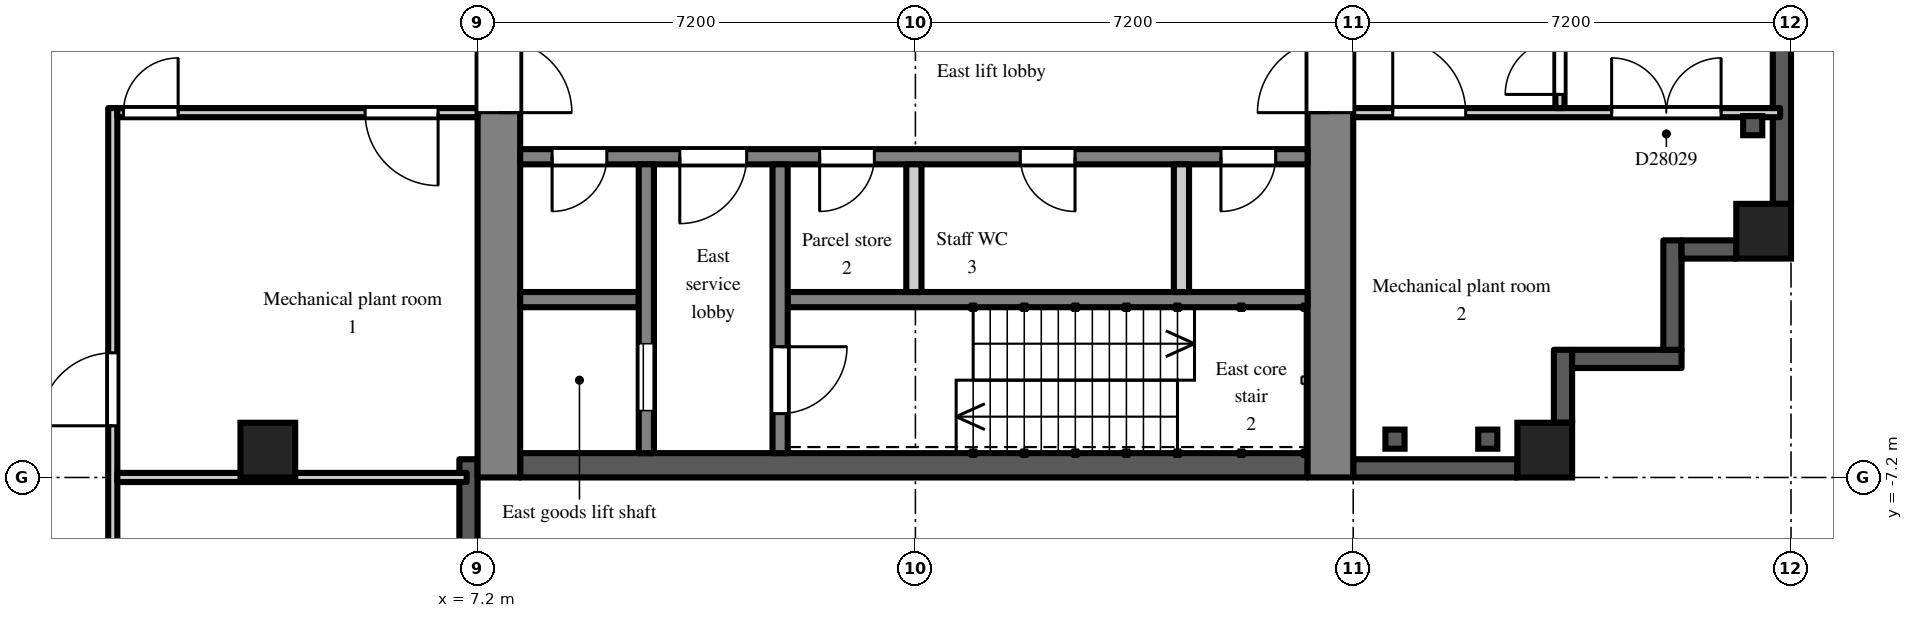
"""IFC4 building model, lengths in metres.
Left out: names, types, materials, properties, quantities, classifications, styles, units other than length and angle.
Written with IfcOpenShell. Run it as: python <this file> out.ifc"""

import sys

from ifc_helpers import new_model, si_unit, direction, frame, frame_2d, origin, origin_2d, place, context, subcontext, project, spatial, rectangle, extrude, element, fill, save


model = new_model("IFC4")
c1 = context("Model", 3, precision=1e-05, world=origin(), true_north=direction((0.0, 1.0)))
c2 = subcontext(c1, "Body", "Model", "MODEL_VIEW")
j1 = project(units=[si_unit("LENGTHUNIT", "METRE"), si_unit("PLANEANGLEUNIT", "RADIAN")], contexts=[c1])
p1 = place(None, origin())
s1 = spatial("IfcSite", under=j1, at=p1, CompositionType="ELEMENT")
p2 = place(p1, origin())
s2 = spatial("IfcBuilding", under=s1, at=p2, CompositionType="ELEMENT")
p3 = place(p2, frame((0.0, 0.0, 194.7)))
s3 = spatial("IfcBuildingStorey", under=s2, at=p3, CompositionType="ELEMENT", Elevation=194.7)
for number, where, z_axis, x_axis in (
    (1, (3.75, -6.75, 0.0), (0.0, 0.0, 1.0), (1.0, 0.0, 0.0)),
    (2, (24.75, -6.75, 0.0), (0.0, 0.0, 1.0), (1.0, 0.0, 0.0)),
    (3, (28.35, -3.15, 0.0), (0.0, 0.0, 1.0), (1.0, 0.0, 0.0)),
):
    element("IfcColumn", number, at=place(p3, frame(where, z_axis=z_axis, x_axis=x_axis)), inside=s3, PredefinedType="COLUMN", context=c2, shape_type="SweptSolid", body=[
        extrude(rectangle(XDim=0.9, YDim=0.9, at=origin_2d()), origin(), (0.0, 0.0, 1.0), 4.2),
    ])
p4 = place(p3, frame((21.6, -7.05, 0.0), z_axis=(0.0, 0.0, 1.0), x_axis=(1.0, 0.0, 0.0)))
e4 = element("IfcWall", 4, at=p4, inside=s3, PredefinedType="SOLIDWALL", context=c2, shape_type="SweptSolid", body=[
    extrude(rectangle(XDim=2.7, YDim=0.3, at=frame_2d((1.35, 0.0))), origin(), (0.0, 0.0, 1.0), 3.5),
])
p5 = place(p3, frame((25.05, -6.3, 0.0), z_axis=(0.0, 0.0, 1.0), x_axis=(0.0, 1.0, 0.0)))
e5 = element("IfcWall", 5, at=p5, inside=s3, PredefinedType="SOLIDWALL", context=c2, shape_type="SweptSolid", body=[
    extrude(rectangle(XDim=1.2, YDim=0.3, at=frame_2d((0.6, 0.0))), origin(), (0.0, 0.0, 1.0), 3.8),
])
for number, where, z_axis, x_axis in (
    (6, (25.2, -5.25, 0.0), (0.0, 0.0, 1.0), (1.0, 0.0, 0.0)),
    (7, (26.85, -5.1, 0.0), (0.0, 0.0, 1.0), (0.0, 1.0, 0.0)),
):
    element("IfcWall", number, at=place(p3, frame(where, z_axis=z_axis, x_axis=x_axis)), inside=s3, PredefinedType="SOLIDWALL", context=c2, shape_type="SweptSolid", body=[
        extrude(rectangle(XDim=1.8, YDim=0.3, at=frame_2d((0.9, 0.0))), origin(), (0.0, 0.0, 1.0), 3.8),
    ])
p6 = place(p3, frame((27.0, -3.45, 0.0), z_axis=(0.0, 0.0, 1.0), x_axis=(1.0, 0.0, 0.0)))
e8 = element("IfcWall", 8, at=p6, inside=s3, PredefinedType="SOLIDWALL", context=c2, shape_type="SweptSolid", body=[
    extrude(rectangle(XDim=0.9, YDim=0.3, at=frame_2d((0.45, 0.0))), origin(), (0.0, 0.0, 1.0), 3.8),
])
p7 = place(p3, frame((28.65, -2.7, 0.0), z_axis=(0.0, 0.0, 1.0), x_axis=(0.0, 1.0, 0.0)))
e9 = element("IfcWall", 9, at=p7, inside=s3, PredefinedType="SOLIDWALL", context=c2, shape_type="SweptSolid", body=[
    extrude(rectangle(XDim=5.4, YDim=0.3, at=frame_2d((2.7, 0.0))), origin(), (0.0, 0.0, 1.0), 3.5),
])
p8 = place(p3, frame((7.05, -14.4, 0.0), z_axis=(0.0, 0.0, 1.0), x_axis=(0.0, 1.0, 0.0)))
e10 = element("IfcWall", 10, at=p8, inside=s3, PredefinedType="SOLIDWALL", context=c2, shape_type="SweptSolid", body=[
    extrude(rectangle(XDim=7.5, YDim=0.3, at=frame_2d((3.75, 0.0))), origin(), (0.0, 0.0, 1.0), 3.8),
])
p9 = place(p3, frame((7.55, -7.2, 0.0), z_axis=(0.0, 0.0, 1.0), x_axis=(0.0, 1.0, 0.0)))
e11 = element("IfcWall", 11, at=p9, inside=s3, PredefinedType="SHEAR", context=c2, shape_type="SweptSolid", body=[
    extrude(rectangle(XDim=14.4, YDim=0.7, at=frame_2d((7.2, 0.0))), origin(), (0.0, 0.0, 1.0), 3.8),
])
p10 = place(p9, frame((6.0, 0.0, 0.0)))
e12 = element("IfcOpeningElement", 12, at=p10, cuts=e11, PredefinedType="OPENING", context=c2, shape_type="SweptSolid", body=[
    extrude(rectangle(XDim=2.4, YDim=2.2, at=frame_2d((1.2, 1.1))), frame((0.0, 0.36, 0.0), z_axis=(0.0, -1.0, 0.0), x_axis=(1.0, 0.0, 0.0)), (0.0, 0.0, 1.0), 0.72),
])
p11 = place(p3, frame((21.225, -7.2, 0.0), z_axis=(0.0, 0.0, 1.0), x_axis=(0.0, 1.0, 0.0)))
e13 = element("IfcWall", 13, at=p11, inside=s3, PredefinedType="SHEAR", context=c2, shape_type="SweptSolid", body=[
    extrude(rectangle(XDim=14.4, YDim=0.75, at=frame_2d((7.2, 0.0))), origin(), (0.0, 0.0, 1.0), 3.8),
])
p12 = place(p11, frame((6.0, 0.0, 0.0)))
e14 = element("IfcOpeningElement", 14, at=p12, cuts=e13, PredefinedType="OPENING", context=c2, shape_type="SweptSolid", body=[
    extrude(rectangle(XDim=2.4, YDim=2.2, at=frame_2d((1.2, 1.1))), frame((0.0, 0.385, 0.0), z_axis=(0.0, -1.0, 0.0), x_axis=(1.0, 0.0, 0.0)), (0.0, 0.0, 1.0), 0.77),
])
p13 = place(p3, frame((7.9, -7.0, 0.0), z_axis=(0.0, 0.0, 1.0), x_axis=(1.0, 0.0, 0.0)))
e15 = element("IfcWall", 15, at=p13, inside=s3, PredefinedType="SHEAR", context=c2, shape_type="SweptSolid", body=[
    extrude(rectangle(XDim=12.95, YDim=0.4, at=frame_2d((6.475, 0.0))), origin(), (0.0, 0.0, 1.0), 3.8),
])
p14 = place(p3, frame((7.9, -1.925, 0.0), z_axis=(0.0, 0.0, 1.0), x_axis=(1.0, 0.0, 0.0)))
e16 = element("IfcWall", 16, at=p14, inside=s3, PredefinedType="SHEAR", context=c2, shape_type="SweptSolid", body=[
    extrude(rectangle(XDim=12.95, YDim=0.25, at=frame_2d((6.475, 0.0))), origin(), (0.0, 0.0, 1.0), 3.8),
])
p15 = place(p14, frame((0.525, 0.0, 0.0)))
e17 = element("IfcOpeningElement", 17, at=p15, cuts=e16, PredefinedType="OPENING", context=c2, shape_type="SweptSolid", body=[
    extrude(rectangle(XDim=0.9, YDim=2.1, at=frame_2d((0.45, 1.05))), frame((0.0, 0.135, 0.0), z_axis=(0.0, -1.0, 0.0), x_axis=(1.0, 0.0, 0.0)), (0.0, 0.0, 1.0), 0.27),
])
p16 = place(p14, frame((2.625, 0.0, 0.0)))
e18 = element("IfcOpeningElement", 18, at=p16, cuts=e16, PredefinedType="OPENING", context=c2, shape_type="SweptSolid", body=[
    extrude(rectangle(XDim=1.1, YDim=2.1, at=frame_2d((0.55, 1.05))), frame((0.0, 0.135, 0.0), z_axis=(0.0, -1.0, 0.0), x_axis=(1.0, 0.0, 0.0)), (0.0, 0.0, 1.0), 0.27),
])
p17 = place(p14, frame((4.925, 0.0, 0.0)))
e19 = element("IfcOpeningElement", 19, at=p17, cuts=e16, PredefinedType="OPENING", context=c2, shape_type="SweptSolid", body=[
    extrude(rectangle(XDim=0.9, YDim=2.1, at=frame_2d((0.45, 1.05))), frame((0.0, 0.135, 0.0), z_axis=(0.0, -1.0, 0.0), x_axis=(1.0, 0.0, 0.0)), (0.0, 0.0, 1.0), 0.27),
])
p18 = place(p14, frame((8.225, 0.0, 0.0)))
e20 = element("IfcOpeningElement", 20, at=p18, cuts=e16, PredefinedType="OPENING", context=c2, shape_type="SweptSolid", body=[
    extrude(rectangle(XDim=0.9, YDim=2.1, at=frame_2d((0.45, 1.05))), frame((0.0, 0.135, 0.0), z_axis=(0.0, -1.0, 0.0), x_axis=(1.0, 0.0, 0.0)), (0.0, 0.0, 1.0), 0.27),
])
p19 = place(p14, frame((11.525, 0.0, 0.0)))
e21 = element("IfcOpeningElement", 21, at=p19, cuts=e16, PredefinedType="OPENING", context=c2, shape_type="SweptSolid", body=[
    extrude(rectangle(XDim=0.9, YDim=2.1, at=frame_2d((0.45, 1.05))), frame((0.0, 0.135, 0.0), z_axis=(0.0, -1.0, 0.0), x_axis=(1.0, 0.0, 0.0)), (0.0, 0.0, 1.0), 0.27),
])
p20 = place(p3, frame((7.9, -4.275, 0.0), z_axis=(0.0, 0.0, 1.0), x_axis=(1.0, 0.0, 0.0)))
e22 = element("IfcWall", 22, at=p20, inside=s3, PredefinedType="SHEAR", context=c2, shape_type="SweptSolid", body=[
    extrude(rectangle(XDim=1.95, YDim=0.25, at=frame_2d((0.975, 0.0))), origin(), (0.0, 0.0, 1.0), 3.8),
])
p21 = place(p3, frame((12.3, -4.275, 0.0), z_axis=(0.0, 0.0, 1.0), x_axis=(1.0, 0.0, 0.0)))
e23 = element("IfcWall", 23, at=p21, inside=s3, PredefinedType="SHEAR", context=c2, shape_type="SweptSolid", body=[
    extrude(rectangle(XDim=8.55, YDim=0.25, at=frame_2d((4.275, 0.0))), origin(), (0.0, 0.0, 1.0), 3.8),
])
p22 = place(p3, frame((9.975, -2.05, 0.0), z_axis=(0.0, 0.0, 1.0), x_axis=(0.0, -1.0, 0.0)))
e24 = element("IfcWall", 24, at=p22, inside=s3, PredefinedType="SHEAR", context=c2, shape_type="SweptSolid", body=[
    extrude(rectangle(XDim=4.75, YDim=0.25, at=frame_2d((2.375, 0.0))), origin(), (0.0, 0.0, 1.0), 3.8),
])
p23 = place(p22, frame((2.95, 0.0, 0.0)))
e25 = element("IfcOpeningElement", 25, at=p23, cuts=e24, PredefinedType="OPENING", context=c2, shape_type="SweptSolid", body=[
    extrude(rectangle(XDim=1.1, YDim=2.1, at=frame_2d((0.55, 1.05))), frame((0.0, 0.135, 0.0), z_axis=(0.0, -1.0, 0.0), x_axis=(1.0, 0.0, 0.0)), (0.0, 0.0, 1.0), 0.27),
])
p24 = place(p3, frame((12.175, -2.05, 0.0), z_axis=(0.0, 0.0, 1.0), x_axis=(0.0, -1.0, 0.0)))
e26 = element("IfcWall", 26, at=p24, inside=s3, PredefinedType="SHEAR", context=c2, shape_type="SweptSolid", body=[
    extrude(rectangle(XDim=4.75, YDim=0.25, at=frame_2d((2.375, 0.0))), origin(), (0.0, 0.0, 1.0), 3.8),
])
p25 = place(p24, frame((3.0, 0.0, 0.0)))
e27 = element("IfcOpeningElement", 27, at=p25, cuts=e26, PredefinedType="OPENING", context=c2, shape_type="SweptSolid", body=[
    extrude(rectangle(XDim=1.1, YDim=2.1, at=frame_2d((0.55, 1.05))), frame((0.0, 0.135, 0.0), z_axis=(0.0, -1.0, 0.0), x_axis=(1.0, 0.0, 0.0)), (0.0, 0.0, 1.0), 0.27),
])
for number, where, z_axis, x_axis in (
    (28, (14.375, -2.05, 0.0), (0.0, 0.0, 1.0), (0.0, -1.0, 0.0)),
    (29, (18.775, -2.05, 0.0), (0.0, 0.0, 1.0), (0.0, -1.0, 0.0)),
):
    element("IfcWall", number, at=place(p3, frame(where, z_axis=z_axis, x_axis=x_axis)), inside=s3, PredefinedType="PARTITIONING", context=c2, shape_type="SweptSolid", body=[
        extrude(rectangle(XDim=2.1, YDim=0.25, at=frame_2d((1.05, 0.0))), origin(), (0.0, 0.0, 1.0), 3.8),
    ])
p26 = place(p3, frame((1.2, -21.42, 0.0), z_axis=(0.0, 0.0, 1.0), x_axis=(0.0, 1.0, 0.0)))
e30 = element("IfcWall", 30, at=p26, inside=s3, PredefinedType="PARTITIONING", context=c2, shape_type="SweptSolid", body=[
    extrude(rectangle(XDim=20.295, YDim=0.15, at=frame_2d((10.147, 0.0))), origin(), (0.0, 0.0, 1.0), 3.8),
])
p27 = place(p26, frame((15.07, 0.0, 0.0)))
e31 = element("IfcOpeningElement", 31, at=p27, cuts=e30, PredefinedType="OPENING", context=c2, shape_type="SweptSolid", body=[
    extrude(rectangle(XDim=1.2, YDim=2.1, at=frame_2d((0.6, 1.05))), frame((0.0, 0.085, 0.0), z_axis=(0.0, -1.0, 0.0), x_axis=(1.0, 0.0, 0.0)), (0.0, 0.0, 1.0), 0.17),
])
p28 = place(p26, frame((9.72, 0.0, 0.0)))
e32 = element("IfcOpeningElement", 32, at=p28, cuts=e30, PredefinedType="OPENING", context=c2, shape_type="SweptSolid", body=[
    extrude(rectangle(XDim=1.8, YDim=2.1, at=frame_2d((0.9, 1.05))), frame((0.0, 0.085, 0.0), z_axis=(0.0, -1.0, 0.0), x_axis=(1.0, 0.0, 0.0)), (0.0, 0.0, 1.0), 0.17),
])
p29 = place(p26, frame((0.97, 0.0, 0.0)))
e33 = element("IfcOpeningElement", 33, at=p29, cuts=e30, PredefinedType="OPENING", context=c2, shape_type="SweptSolid", body=[
    extrude(rectangle(XDim=1.2, YDim=2.1, at=frame_2d((0.6, 1.05))), frame((0.0, 0.085, 0.0), z_axis=(0.0, -1.0, 0.0), x_axis=(1.0, 0.0, 0.0)), (0.0, 0.0, 1.0), 0.17),
])
p30 = place(p26, frame((2.67, 0.0, 0.0)))
e34 = element("IfcOpeningElement", 34, at=p30, cuts=e30, PredefinedType="OPENING", context=c2, shape_type="SweptSolid", body=[
    extrude(rectangle(XDim=1.8, YDim=2.1, at=frame_2d((0.9, 1.05))), frame((0.0, 0.085, 0.0), z_axis=(0.0, -1.0, 0.0), x_axis=(1.0, 0.0, 0.0)), (0.0, 0.0, 1.0), 0.17),
])
p31 = place(p3, frame((1.275, -7.2, 0.0), z_axis=(0.0, 0.0, 1.0), x_axis=(1.0, 0.0, 0.0)))
e35 = element("IfcWall", 35, at=p31, inside=s3, PredefinedType="PARTITIONING", context=c2, shape_type="SweptSolid", body=[
    extrude(rectangle(XDim=2.475, YDim=0.15, at=frame_2d((1.238, 0.0))), origin(), (0.0, 0.0, 1.0), 3.8),
])
p32 = place(p3, frame((1.275, -1.2, 0.0), z_axis=(0.0, 0.0, 1.0), x_axis=(1.0, 0.0, 0.0)))
e36 = element("IfcWall", 36, at=p32, inside=s3, PredefinedType="PARTITIONING", context=c2, shape_type="SweptSolid", body=[
    extrude(rectangle(XDim=5.925, YDim=0.15, at=frame_2d((2.962, 0.0))), origin(), (0.0, 0.0, 1.0), 3.8),
])
p33 = place(p32, frame((0.1, 0.0, 0.0)))
e37 = element("IfcOpeningElement", 37, at=p33, cuts=e36, PredefinedType="OPENING", context=c2, shape_type="SweptSolid", body=[
    extrude(rectangle(XDim=0.9, YDim=2.1, at=frame_2d((0.45, 1.05))), frame((0.0, 0.085, 0.0), z_axis=(0.0, -1.0, 0.0), x_axis=(1.0, 0.0, 0.0)), (0.0, 0.0, 1.0), 0.17),
])
p34 = place(p32, frame((4.075, 0.0, 0.0)))
e38 = element("IfcOpeningElement", 38, at=p34, cuts=e36, PredefinedType="OPENING", context=c2, shape_type="SweptSolid", body=[
    extrude(rectangle(XDim=1.2, YDim=2.1, at=frame_2d((0.6, 1.05))), frame((0.0, 0.085, 0.0), z_axis=(0.0, -1.0, 0.0), x_axis=(1.0, 0.0, 0.0)), (0.0, 0.0, 1.0), 0.17),
])
p35 = place(p3, frame((21.6, -1.2, 0.0), z_axis=(0.0, 0.0, 1.0), x_axis=(1.0, 0.0, 0.0)))
e39 = element("IfcWall", 39, at=p35, inside=s3, PredefinedType="PARTITIONING", context=c2, shape_type="SweptSolid", body=[
    extrude(rectangle(XDim=7.02, YDim=0.15, at=frame_2d((3.51, 0.0))), origin(), (0.0, 0.0, 1.0), 3.8),
])
p36 = place(p35, frame((0.65, 0.0, 0.0)))
e40 = element("IfcOpeningElement", 40, at=p36, cuts=e39, PredefinedType="OPENING", context=c2, shape_type="SweptSolid", body=[
    extrude(rectangle(XDim=1.2, YDim=2.1, at=frame_2d((0.6, 1.05))), frame((0.0, 0.085, 0.0), z_axis=(0.0, -1.0, 0.0), x_axis=(1.0, 0.0, 0.0)), (0.0, 0.0, 1.0), 0.17),
])
p37 = place(p35, frame((4.25, 0.0, 0.0)))
e41 = element("IfcOpeningElement", 41, at=p37, cuts=e39, PredefinedType="OPENING", context=c2, shape_type="SweptSolid", body=[
    extrude(rectangle(XDim=1.8, YDim=2.1, at=frame_2d((0.9, 1.05))), frame((0.0, 0.085, 0.0), z_axis=(0.0, -1.0, 0.0), x_axis=(1.0, 0.0, 0.0)), (0.0, 0.0, 1.0), 0.17),
])
p38 = place(p3, frame((25.0, -1.125, 0.0), z_axis=(0.0, 0.0, 1.0), x_axis=(0.0, 1.0, 0.0)))
e42 = element("IfcWall", 42, at=p38, inside=s3, PredefinedType="PARTITIONING", context=c2, shape_type="SweptSolid", body=[
    extrude(rectangle(XDim=2.25, YDim=0.15, at=frame_2d((1.125, 0.0))), origin(), (0.0, 0.0, 1.0), 3.8),
])
p39 = place(p38, frame((0.225, 0.0, 0.0)))
e43 = element("IfcOpeningElement", 43, at=p39, cuts=e42, PredefinedType="OPENING", context=c2, shape_type="SweptSolid", body=[
    extrude(rectangle(XDim=1.8, YDim=2.1, at=frame_2d((0.9, 1.05))), frame((0.0, 0.085, 0.0), z_axis=(0.0, -1.0, 0.0), x_axis=(1.0, 0.0, 0.0)), (0.0, 0.0, 1.0), 0.17),
])
p40 = place(p3, frame((3.75, -7.2, 0.0), z_axis=(0.0, 0.0, 1.0), x_axis=(1.0, 0.0, 0.0)))
e44 = element("IfcWall", 44, at=p40, inside=s3, PredefinedType="PARTITIONING", context=c2, shape_type="SweptSolid", body=[
    extrude(rectangle(XDim=3.27, YDim=0.15, at=frame_2d((1.635, 0.0))), origin(), (0.0, 0.0, 1.0), 3.5),
])
p41 = place(p23, origin())
e45 = element("IfcDoor", 45, at=p41, inside=s3, OperationType="SLIDING_TO_LEFT", PredefinedType="DOOR", context=c2, shape_type="SweptSolid", body=[
    extrude(rectangle(XDim=1.1, YDim=2.1, at=frame_2d((0.55, 1.05))), frame((0.0, 0.025, 0.0), z_axis=(0.0, -1.0, 0.0), x_axis=(1.0, 0.0, 0.0)), (0.0, 0.0, 1.0), 0.05),
])
fill(e25, e45)
p42 = place(p25, origin())
e46 = element("IfcDoor", 46, at=p42, inside=s3, OperationType="SINGLE_SWING_LEFT", PredefinedType="DOOR", context=c2, shape_type="SweptSolid", body=[
    extrude(rectangle(XDim=1.1, YDim=2.1, at=frame_2d((0.55, 1.05))), frame((0.0, 0.025, 0.0), z_axis=(0.0, -1.0, 0.0), x_axis=(1.0, 0.0, 0.0)), (0.0, 0.0, 1.0), 0.05),
])
fill(e27, e46)
p43 = place(p15, frame((0.9, 0.0, 0.0), z_axis=(0.0, 0.0, 1.0), x_axis=(-1.0, 0.0, 0.0)))
e47 = element("IfcDoor", 47, at=p43, inside=s3, OperationType="SINGLE_SWING_RIGHT", PredefinedType="DOOR", context=c2, shape_type="SweptSolid", body=[
    extrude(rectangle(XDim=0.9, YDim=2.1, at=frame_2d((0.45, 1.05))), frame((0.0, 0.025, 0.0), z_axis=(0.0, -1.0, 0.0), x_axis=(1.0, 0.0, 0.0)), (0.0, 0.0, 1.0), 0.05),
])
fill(e17, e47)
p44 = place(p16, frame((1.1, 0.0, 0.0), z_axis=(0.0, 0.0, 1.0), x_axis=(-1.0, 0.0, 0.0)))
e48 = element("IfcDoor", 48, at=p44, inside=s3, OperationType="SINGLE_SWING_RIGHT", PredefinedType="DOOR", context=c2, shape_type="SweptSolid", body=[
    extrude(rectangle(XDim=1.1, YDim=2.1, at=frame_2d((0.55, 1.05))), frame((0.0, 0.025, 0.0), z_axis=(0.0, -1.0, 0.0), x_axis=(1.0, 0.0, 0.0)), (0.0, 0.0, 1.0), 0.05),
])
fill(e18, e48)
p45 = place(p10, frame((2.4, 0.0, 0.0), z_axis=(0.0, 0.0, 1.0), x_axis=(-1.0, 0.0, 0.0)))
e49 = element("IfcDoor", 49, at=p45, inside=s3, OperationType="DOUBLE_DOOR_DOUBLE_SWING", PredefinedType="DOOR", context=c2, shape_type="SweptSolid", body=[
    extrude(rectangle(XDim=2.4, YDim=2.2, at=frame_2d((1.2, 1.1))), frame((0.0, 0.025, 0.0), z_axis=(0.0, -1.0, 0.0), x_axis=(1.0, 0.0, 0.0)), (0.0, 0.0, 1.0), 0.05),
])
fill(e12, e49)
p46 = place(p12, origin())
e50 = element("IfcDoor", 50, at=p46, inside=s3, OperationType="DOUBLE_DOOR_DOUBLE_SWING", PredefinedType="DOOR", context=c2, shape_type="SweptSolid", body=[
    extrude(rectangle(XDim=2.4, YDim=2.2, at=frame_2d((1.2, 1.1))), frame((0.0, 0.025, 0.0), z_axis=(0.0, -1.0, 0.0), x_axis=(1.0, 0.0, 0.0)), (0.0, 0.0, 1.0), 0.05),
])
fill(e14, e50)
p47 = place(p17, frame((0.9, 0.0, 0.0), z_axis=(0.0, 0.0, 1.0), x_axis=(-1.0, 0.0, 0.0)))
e51 = element("IfcDoor", 51, at=p47, inside=s3, OperationType="SINGLE_SWING_RIGHT", PredefinedType="DOOR", context=c2, shape_type="SweptSolid", body=[
    extrude(rectangle(XDim=0.9, YDim=2.1, at=frame_2d((0.45, 1.05))), frame((0.0, 0.025, 0.0), z_axis=(0.0, -1.0, 0.0), x_axis=(1.0, 0.0, 0.0)), (0.0, 0.0, 1.0), 0.05),
])
fill(e19, e51)
p48 = place(p18, frame((0.9, 0.0, 0.0), z_axis=(0.0, 0.0, 1.0), x_axis=(-1.0, 0.0, 0.0)))
e52 = element("IfcDoor", 52, at=p48, inside=s3, OperationType="SINGLE_SWING_LEFT", PredefinedType="DOOR", context=c2, shape_type="SweptSolid", body=[
    extrude(rectangle(XDim=0.9, YDim=2.1, at=frame_2d((0.45, 1.05))), frame((0.0, 0.025, 0.0), z_axis=(0.0, -1.0, 0.0), x_axis=(1.0, 0.0, 0.0)), (0.0, 0.0, 1.0), 0.05),
])
fill(e20, e52)
p49 = place(p19, frame((0.9, 0.0, 0.0), z_axis=(0.0, 0.0, 1.0), x_axis=(-1.0, 0.0, 0.0)))
e53 = element("IfcDoor", 53, at=p49, inside=s3, OperationType="SINGLE_SWING_RIGHT", PredefinedType="DOOR", context=c2, shape_type="SweptSolid", body=[
    extrude(rectangle(XDim=0.9, YDim=2.1, at=frame_2d((0.45, 1.05))), frame((0.0, 0.025, 0.0), z_axis=(0.0, -1.0, 0.0), x_axis=(1.0, 0.0, 0.0)), (0.0, 0.0, 1.0), 0.05),
])
fill(e21, e53)
p50 = place(p27, origin())
e54 = element("IfcDoor", 54, at=p50, inside=s3, OperationType="SINGLE_SWING_LEFT", PredefinedType="DOOR", context=c2, shape_type="SweptSolid", body=[
    extrude(rectangle(XDim=1.2, YDim=2.1, at=frame_2d((0.6, 1.05))), frame((0.0, 0.025, 0.0), z_axis=(0.0, -1.0, 0.0), x_axis=(1.0, 0.0, 0.0)), (0.0, 0.0, 1.0), 0.05),
])
fill(e31, e54)
p51 = place(p33, origin())
e55 = element("IfcDoor", 55, at=p51, inside=s3, OperationType="SINGLE_SWING_RIGHT", PredefinedType="DOOR", context=c2, shape_type="SweptSolid", body=[
    extrude(rectangle(XDim=0.9, YDim=2.1, at=frame_2d((0.45, 1.05))), frame((0.0, 0.025, 0.0), z_axis=(0.0, -1.0, 0.0), x_axis=(1.0, 0.0, 0.0)), (0.0, 0.0, 1.0), 0.05),
])
fill(e37, e55)
p52 = place(p34, frame((1.2, 0.0, 0.0), z_axis=(0.0, 0.0, 1.0), x_axis=(-1.0, 0.0, 0.0)))
e56 = element("IfcDoor", 56, at=p52, inside=s3, OperationType="SINGLE_SWING_LEFT", PredefinedType="DOOR", context=c2, shape_type="SweptSolid", body=[
    extrude(rectangle(XDim=1.2, YDim=2.1, at=frame_2d((0.6, 1.05))), frame((0.0, 0.025, 0.0), z_axis=(0.0, -1.0, 0.0), x_axis=(1.0, 0.0, 0.0)), (0.0, 0.0, 1.0), 0.05),
])
fill(e38, e56)
p53 = place(p39, origin())
e57 = element("IfcDoor", 57, at=p53, inside=s3, OperationType="DOUBLE_DOOR_DOUBLE_SWING", PredefinedType="DOOR", context=c2, shape_type="SweptSolid", body=[
    extrude(rectangle(XDim=1.8, YDim=2.1, at=frame_2d((0.9, 1.05))), frame((0.0, 0.025, 0.0), z_axis=(0.0, -1.0, 0.0), x_axis=(1.0, 0.0, 0.0)), (0.0, 0.0, 1.0), 0.05),
])
fill(e43, e57)
p54 = place(p36, origin())
e58 = element("IfcDoor", 58, at=p54, inside=s3, OperationType="SINGLE_SWING_LEFT", PredefinedType="DOOR", context=c2, shape_type="SweptSolid", body=[
    extrude(rectangle(XDim=1.2, YDim=2.1, at=frame_2d((0.6, 1.05))), frame((0.0, 0.025, 0.0), z_axis=(0.0, -1.0, 0.0), x_axis=(1.0, 0.0, 0.0)), (0.0, 0.0, 1.0), 0.05),
])
fill(e40, e58)
p55 = place(p37, origin())
e59 = element("IfcDoor", 59, at=p55, inside=s3, OperationType="DOUBLE_DOOR_DOUBLE_SWING", PredefinedType="DOOR", context=c2, shape_type="SweptSolid", body=[
    extrude(rectangle(XDim=1.8, YDim=2.1, at=frame_2d((0.9, 1.05))), frame((0.0, 0.025, 0.0), z_axis=(0.0, -1.0, 0.0), x_axis=(1.0, 0.0, 0.0)), (0.0, 0.0, 1.0), 0.05),
])
fill(e41, e59)
save(model, sys.argv[1])
